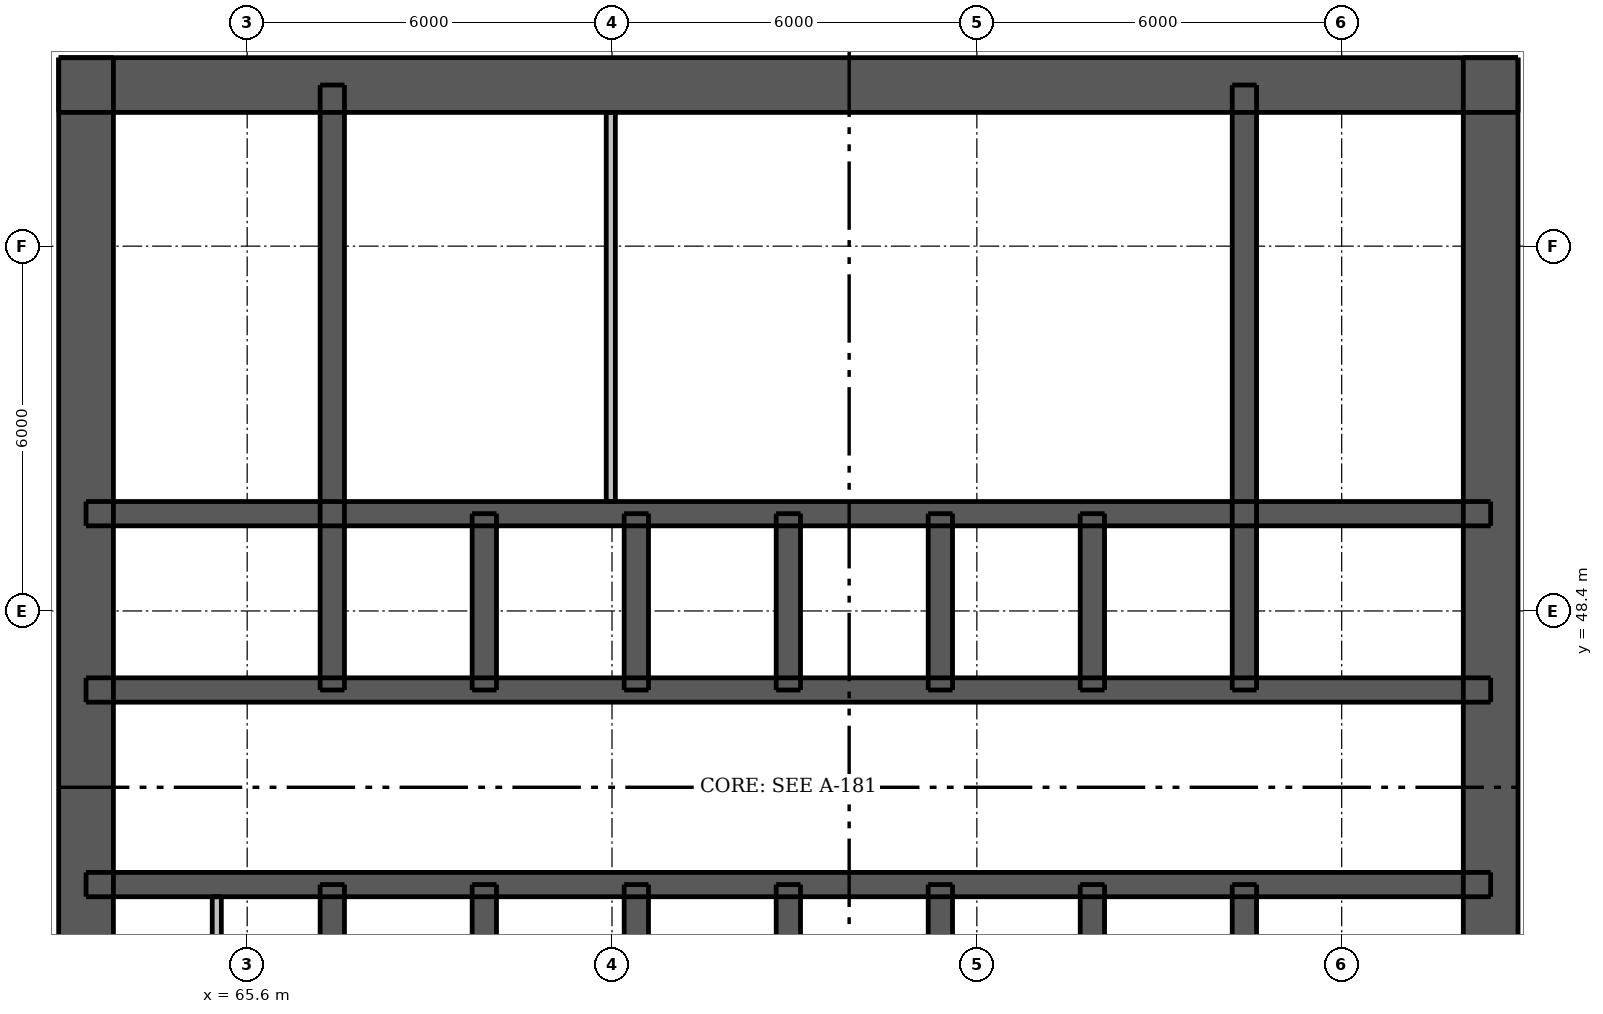
"""IFC4 building model, lengths in metres.
Left out: names, types, materials, properties, quantities, classifications, styles, units other than length and angle.
Written with IfcOpenShell. Run it as: python <this file> out.ifc"""

import sys

from ifc_helpers import new_model, si_unit, direction, frame, frame_2d, origin, place, context, subcontext, project, spatial, rectangle, extrude, element, fill, save


model = new_model("IFC4")
c1 = context("Model", 3, precision=1e-05, world=origin(), true_north=direction((0.0, 1.0)))
c2 = subcontext(c1, "Body", "Model", "MODEL_VIEW")
j1 = project(units=[si_unit("LENGTHUNIT", "METRE"), si_unit("PLANEANGLEUNIT", "RADIAN")], contexts=[c1])
p1 = place(None, origin())
s1 = spatial("IfcSite", under=j1, at=p1, CompositionType="ELEMENT")
p2 = place(p1, origin())
s2 = spatial("IfcBuilding", under=s1, at=p2, CompositionType="ELEMENT")
p3 = place(p2, frame((0.0, 0.0, 5.5)))
s3 = spatial("IfcBuildingStorey", under=s2, at=p3, CompositionType="ELEMENT", Elevation=5.5)
p4 = place(p3, frame((62.5, 57.05, 0.0), z_axis=(0.0, 0.0, 1.0), x_axis=(1.0, 0.0, 0.0)))
e1 = element("IfcWall", 1, at=p4, inside=s3, PredefinedType="SHEAR", context=c2, shape_type="SweptSolid", body=[
    extrude(rectangle(XDim=24.0, YDim=0.9, at=frame_2d((12.0, 0.0))), origin(), (0.0, 0.0, 1.0), 4.2),
])
p5 = place(p4, frame((20.85, 0.0, 0.0)))
e2 = element("IfcOpeningElement", 2, at=p5, cuts=e1, PredefinedType="OPENING", context=c2, shape_type="SweptSolid", body=[
    extrude(rectangle(XDim=1.1, YDim=2.1, at=frame_2d((0.55, 1.05))), frame((0.0, 0.46, 0.0), z_axis=(0.0, -1.0, 0.0), x_axis=(1.0, 0.0, 0.0)), (0.0, 0.0, 1.0), 0.92),
])
p6 = place(p4, frame((2.05, 0.0, 0.0)))
e3 = element("IfcOpeningElement", 3, at=p6, cuts=e1, PredefinedType="OPENING", context=c2, shape_type="SweptSolid", body=[
    extrude(rectangle(XDim=1.1, YDim=2.1, at=frame_2d((0.55, 1.05))), frame((0.0, 0.46, 0.0), z_axis=(0.0, -1.0, 0.0), x_axis=(1.0, 0.0, 0.0)), (0.0, 0.0, 1.0), 0.92),
])
p7 = place(p4, frame((6.44, 0.0, 0.0)))
e4 = element("IfcOpeningElement", 4, at=p7, cuts=e1, PredefinedType="OPENING", context=c2, shape_type="SweptSolid", body=[
    extrude(rectangle(XDim=0.9, YDim=2.1, at=frame_2d((0.45, 1.05))), frame((0.0, 0.46, 0.0), z_axis=(0.0, -1.0, 0.0), x_axis=(1.0, 0.0, 0.0)), (0.0, 0.0, 1.0), 0.92),
])
p8 = place(p4, frame((13.74, 0.0, 0.0)))
e5 = element("IfcOpeningElement", 5, at=p8, cuts=e1, PredefinedType="OPENING", context=c2, shape_type="SweptSolid", body=[
    extrude(rectangle(XDim=0.9, YDim=2.1, at=frame_2d((0.45, 1.05))), frame((0.0, 0.46, 0.0), z_axis=(0.0, -1.0, 0.0), x_axis=(1.0, 0.0, 0.0)), (0.0, 0.0, 1.0), 0.92),
])
p9 = place(p3, frame((62.95, 33.5, 0.0), z_axis=(0.0, 0.0, 1.0), x_axis=(0.0, 1.0, 0.0)))
e6 = element("IfcWall", 6, at=p9, inside=s3, PredefinedType="SHEAR", context=c2, shape_type="SweptSolid", body=[
    extrude(rectangle(XDim=24.0, YDim=0.9, at=frame_2d((12.0, 0.0))), origin(), (0.0, 0.0, 1.0), 4.2),
])
p10 = place(p9, frame((11.2, 0.0, 0.0)))
e7 = element("IfcOpeningElement", 7, at=p10, cuts=e6, PredefinedType="OPENING", context=c2, shape_type="SweptSolid", body=[
    extrude(rectangle(XDim=1.6, YDim=2.1, at=frame_2d((0.8, 1.05))), frame((0.0, 0.46, 0.0), z_axis=(0.0, -1.0, 0.0), x_axis=(1.0, 0.0, 0.0)), (0.0, 0.0, 1.0), 0.92),
])
p11 = place(p3, frame((86.05, 33.5, 0.0), z_axis=(0.0, 0.0, 1.0), x_axis=(0.0, 1.0, 0.0)))
e8 = element("IfcWall", 8, at=p11, inside=s3, PredefinedType="SHEAR", context=c2, shape_type="SweptSolid", body=[
    extrude(rectangle(XDim=24.0, YDim=0.9, at=frame_2d((12.0, 0.0))), origin(), (0.0, 0.0, 1.0), 4.2),
])
p12 = place(p11, frame((11.2, 0.0, 0.0)))
e9 = element("IfcOpeningElement", 9, at=p12, cuts=e8, PredefinedType="OPENING", context=c2, shape_type="SweptSolid", body=[
    extrude(rectangle(XDim=1.6, YDim=2.1, at=frame_2d((0.8, 1.05))), frame((0.0, 0.46, 0.0), z_axis=(0.0, -1.0, 0.0), x_axis=(1.0, 0.0, 0.0)), (0.0, 0.0, 1.0), 0.92),
])
p13 = place(p3, frame((62.95, 43.9, 0.0), z_axis=(0.0, 0.0, 1.0), x_axis=(1.0, 0.0, 0.0)))
e10 = element("IfcWall", 10, at=p13, inside=s3, PredefinedType="SHEAR", context=c2, shape_type="SweptSolid", body=[
    extrude(rectangle(XDim=23.1, YDim=0.4, at=frame_2d((11.55, 0.0))), origin(), (0.0, 0.0, 1.0), 4.2),
])
p14 = place(p13, frame((0.85, 0.0, 0.0)))
e11 = element("IfcOpeningElement", 11, at=p14, cuts=e10, PredefinedType="OPENING", context=c2, shape_type="SweptSolid", body=[
    extrude(rectangle(XDim=0.9, YDim=2.1, at=frame_2d((0.45, 1.05))), frame((0.0, 0.21, 0.0), z_axis=(0.0, -1.0, 0.0), x_axis=(1.0, 0.0, 0.0)), (0.0, 0.0, 1.0), 0.42),
])
p15 = place(p13, frame((2.55, 0.0, 0.0)))
e12 = element("IfcOpeningElement", 12, at=p15, cuts=e10, PredefinedType="OPENING", context=c2, shape_type="SweptSolid", body=[
    extrude(rectangle(XDim=0.9, YDim=2.1, at=frame_2d((0.45, 1.05))), frame((0.0, 0.21, 0.0), z_axis=(0.0, -1.0, 0.0), x_axis=(1.0, 0.0, 0.0)), (0.0, 0.0, 1.0), 0.42),
])
p16 = place(p13, frame((20.5, 0.0, 0.0)))
e13 = element("IfcOpeningElement", 13, at=p16, cuts=e10, PredefinedType="OPENING", context=c2, shape_type="SweptSolid", body=[
    extrude(rectangle(XDim=0.9, YDim=2.1, at=frame_2d((0.45, 1.05))), frame((0.0, 0.21, 0.0), z_axis=(0.0, -1.0, 0.0), x_axis=(1.0, 0.0, 0.0)), (0.0, 0.0, 1.0), 0.42),
])
p17 = place(p13, frame((4.75, 0.0, 0.0)))
e14 = element("IfcOpeningElement", 14, at=p17, cuts=e10, PredefinedType="OPENING", context=c2, shape_type="SweptSolid", body=[
    extrude(rectangle(XDim=1.1, YDim=2.1, at=frame_2d((0.55, 1.05))), frame((0.0, 0.21, 0.0), z_axis=(0.0, -1.0, 0.0), x_axis=(1.0, 0.0, 0.0)), (0.0, 0.0, 1.0), 0.42),
])
p18 = place(p13, frame((7.25, 0.0, 0.0)))
e15 = element("IfcOpeningElement", 15, at=p18, cuts=e10, PredefinedType="OPENING", context=c2, shape_type="SweptSolid", body=[
    extrude(rectangle(XDim=1.1, YDim=2.1, at=frame_2d((0.55, 1.05))), frame((0.0, 0.21, 0.0), z_axis=(0.0, -1.0, 0.0), x_axis=(1.0, 0.0, 0.0)), (0.0, 0.0, 1.0), 0.42),
])
p19 = place(p13, frame((9.75, 0.0, 0.0)))
e16 = element("IfcOpeningElement", 16, at=p19, cuts=e10, PredefinedType="OPENING", context=c2, shape_type="SweptSolid", body=[
    extrude(rectangle(XDim=1.1, YDim=2.1, at=frame_2d((0.55, 1.05))), frame((0.0, 0.21, 0.0), z_axis=(0.0, -1.0, 0.0), x_axis=(1.0, 0.0, 0.0)), (0.0, 0.0, 1.0), 0.42),
])
p20 = place(p13, frame((12.25, 0.0, 0.0)))
e17 = element("IfcOpeningElement", 17, at=p20, cuts=e10, PredefinedType="OPENING", context=c2, shape_type="SweptSolid", body=[
    extrude(rectangle(XDim=1.1, YDim=2.1, at=frame_2d((0.55, 1.05))), frame((0.0, 0.21, 0.0), z_axis=(0.0, -1.0, 0.0), x_axis=(1.0, 0.0, 0.0)), (0.0, 0.0, 1.0), 0.42),
])
p21 = place(p13, frame((14.75, 0.0, 0.0)))
e18 = element("IfcOpeningElement", 18, at=p21, cuts=e10, PredefinedType="OPENING", context=c2, shape_type="SweptSolid", body=[
    extrude(rectangle(XDim=1.1, YDim=2.1, at=frame_2d((0.55, 1.05))), frame((0.0, 0.21, 0.0), z_axis=(0.0, -1.0, 0.0), x_axis=(1.0, 0.0, 0.0)), (0.0, 0.0, 1.0), 0.42),
])
p22 = place(p13, frame((17.25, 0.0, 0.0)))
e19 = element("IfcOpeningElement", 19, at=p22, cuts=e10, PredefinedType="OPENING", context=c2, shape_type="SweptSolid", body=[
    extrude(rectangle(XDim=1.1, YDim=2.1, at=frame_2d((0.55, 1.05))), frame((0.0, 0.21, 0.0), z_axis=(0.0, -1.0, 0.0), x_axis=(1.0, 0.0, 0.0)), (0.0, 0.0, 1.0), 0.42),
])
p23 = place(p3, frame((62.95, 47.1, 0.0), z_axis=(0.0, 0.0, 1.0), x_axis=(1.0, 0.0, 0.0)))
e20 = element("IfcWall", 20, at=p23, inside=s3, PredefinedType="SHEAR", context=c2, shape_type="SweptSolid", body=[
    extrude(rectangle(XDim=23.1, YDim=0.4, at=frame_2d((11.55, 0.0))), origin(), (0.0, 0.0, 1.0), 4.2),
])
p24 = place(p23, frame((1.7, 0.0, 0.0)))
e21 = element("IfcOpeningElement", 21, at=p24, cuts=e20, PredefinedType="OPENING", context=c2, shape_type="SweptSolid", body=[
    extrude(rectangle(XDim=0.9, YDim=2.1, at=frame_2d((0.45, 1.05))), frame((0.0, 0.21, 0.0), z_axis=(0.0, -1.0, 0.0), x_axis=(1.0, 0.0, 0.0)), (0.0, 0.0, 1.0), 0.42),
])
p25 = place(p23, frame((20.5, 0.0, 0.0)))
e22 = element("IfcOpeningElement", 22, at=p25, cuts=e20, PredefinedType="OPENING", context=c2, shape_type="SweptSolid", body=[
    extrude(rectangle(XDim=0.9, YDim=2.1, at=frame_2d((0.45, 1.05))), frame((0.0, 0.21, 0.0), z_axis=(0.0, -1.0, 0.0), x_axis=(1.0, 0.0, 0.0)), (0.0, 0.0, 1.0), 0.42),
])
p26 = place(p3, frame((62.95, 50.0, 0.0), z_axis=(0.0, 0.0, 1.0), x_axis=(1.0, 0.0, 0.0)))
e23 = element("IfcWall", 23, at=p26, inside=s3, PredefinedType="SHEAR", context=c2, shape_type="SweptSolid", body=[
    extrude(rectangle(XDim=23.1, YDim=0.4, at=frame_2d((11.55, 0.0))), origin(), (0.0, 0.0, 1.0), 4.2),
])
p27 = place(p3, frame((67.0, 33.95, 0.0), z_axis=(0.0, 0.0, 1.0), x_axis=(0.0, 1.0, 0.0)))
e24 = element("IfcWall", 24, at=p27, inside=s3, PredefinedType="SHEAR", context=c2, shape_type="SweptSolid", body=[
    extrude(rectangle(XDim=9.95, YDim=0.4, at=frame_2d((4.975, 0.0))), origin(), (0.0, 0.0, 1.0), 4.2),
])
p28 = place(p27, frame((0.65, 0.0, 0.0)))
e25 = element("IfcOpeningElement", 25, at=p28, cuts=e24, PredefinedType="OPENING", context=c2, shape_type="SweptSolid", body=[
    extrude(rectangle(XDim=1.1, YDim=2.1, at=frame_2d((0.55, 1.05))), frame((0.0, 0.21, 0.0), z_axis=(0.0, -1.0, 0.0), x_axis=(1.0, 0.0, 0.0)), (0.0, 0.0, 1.0), 0.42),
])
for number, where, z_axis, x_axis in (
    (26, (67.0, 47.1, 0.0), (0.0, 0.0, 1.0), (0.0, 1.0, 0.0)),
    (27, (82.0, 33.95, 0.0), (0.0, 0.0, 1.0), (0.0, 1.0, 0.0)),
    (28, (82.0, 47.1, 0.0), (0.0, 0.0, 1.0), (0.0, 1.0, 0.0)),
):
    element("IfcWall", number, at=place(p3, frame(where, z_axis=z_axis, x_axis=x_axis)), inside=s3, PredefinedType="SHEAR", context=c2, shape_type="SweptSolid", body=[
        extrude(rectangle(XDim=9.95, YDim=0.4, at=frame_2d((4.975, 0.0))), origin(), (0.0, 0.0, 1.0), 4.2),
    ])
for number, where, z_axis, x_axis in (
    (29, (69.5, 41.0, 0.0), (0.0, 0.0, 1.0), (0.0, 1.0, 0.0)),
    (30, (69.5, 47.1, 0.0), (0.0, 0.0, 1.0), (0.0, 1.0, 0.0)),
    (31, (72.0, 41.0, 0.0), (0.0, 0.0, 1.0), (0.0, 1.0, 0.0)),
    (32, (72.0, 47.1, 0.0), (0.0, 0.0, 1.0), (0.0, 1.0, 0.0)),
    (33, (74.5, 41.0, 0.0), (0.0, 0.0, 1.0), (0.0, 1.0, 0.0)),
    (34, (74.5, 47.1, 0.0), (0.0, 0.0, 1.0), (0.0, 1.0, 0.0)),
    (35, (77.0, 41.0, 0.0), (0.0, 0.0, 1.0), (0.0, 1.0, 0.0)),
    (36, (77.0, 47.1, 0.0), (0.0, 0.0, 1.0), (0.0, 1.0, 0.0)),
    (37, (79.5, 41.0, 0.0), (0.0, 0.0, 1.0), (0.0, 1.0, 0.0)),
    (38, (79.5, 47.1, 0.0), (0.0, 0.0, 1.0), (0.0, 1.0, 0.0)),
):
    element("IfcWall", number, at=place(p3, frame(where, z_axis=z_axis, x_axis=x_axis)), inside=s3, PredefinedType="SHEAR", context=c2, shape_type="SweptSolid", body=[
        extrude(rectangle(XDim=2.9, YDim=0.4, at=frame_2d((1.45, 0.0))), origin(), (0.0, 0.0, 1.0), 4.2),
    ])
p29 = place(p3, frame((65.1, 41.2, 0.0), z_axis=(0.0, 0.0, 1.0), x_axis=(0.0, 1.0, 0.0)))
e39 = element("IfcWall", 39, at=p29, inside=s3, PredefinedType="PLUMBINGWALL", context=c2, shape_type="SweptSolid", body=[
    extrude(rectangle(XDim=2.5, YDim=0.15, at=frame_2d((1.25, 0.0))), origin(), (0.0, 0.0, 1.0), 4.2),
])
p30 = place(p3, frame((71.58, 50.2, 0.0), z_axis=(0.0, 0.0, 1.0), x_axis=(0.0, 1.0, 0.0)))
e40 = element("IfcWall", 40, at=p30, inside=s3, PredefinedType="PLUMBINGWALL", context=c2, shape_type="SweptSolid", body=[
    extrude(rectangle(XDim=6.4, YDim=0.15, at=frame_2d((3.2, 0.0))), origin(), (0.0, 0.0, 1.0), 4.2),
])
p31 = place(p5, origin())
e41 = element("IfcDoor", 41, at=p31, inside=s3, OperationType="SINGLE_SWING_RIGHT", PredefinedType="DOOR", context=c2, shape_type="SweptSolid", body=[
    extrude(rectangle(XDim=1.1, YDim=2.1, at=frame_2d((0.55, 1.05))), frame((0.0, -0.388, 0.0), z_axis=(0.0, -1.0, 0.0), x_axis=(1.0, 0.0, 0.0)), (0.0, 0.0, 1.0), 0.05),
])
fill(e2, e41)
p32 = place(p6, origin())
e42 = element("IfcDoor", 42, at=p32, inside=s3, OperationType="SINGLE_SWING_LEFT", PredefinedType="DOOR", context=c2, shape_type="SweptSolid", body=[
    extrude(rectangle(XDim=1.1, YDim=2.1, at=frame_2d((0.55, 1.05))), frame((0.0, -0.388, 0.0), z_axis=(0.0, -1.0, 0.0), x_axis=(1.0, 0.0, 0.0)), (0.0, 0.0, 1.0), 0.05),
])
fill(e3, e42)
p33 = place(p10, origin())
e43 = element("IfcDoor", 43, at=p33, inside=s3, OperationType="DOUBLE_DOOR_SINGLE_SWING", PredefinedType="DOOR", context=c2, shape_type="SweptSolid", body=[
    extrude(rectangle(XDim=1.6, YDim=2.1, at=frame_2d((0.8, 1.05))), frame((0.0, -0.388, 0.0), z_axis=(0.0, -1.0, 0.0), x_axis=(1.0, 0.0, 0.0)), (0.0, 0.0, 1.0), 0.05),
])
fill(e7, e43)
p34 = place(p12, origin())
e44 = element("IfcDoor", 44, at=p34, inside=s3, OperationType="DOUBLE_DOOR_SINGLE_SWING", PredefinedType="DOOR", context=c2, shape_type="SweptSolid", body=[
    extrude(rectangle(XDim=1.6, YDim=2.1, at=frame_2d((0.8, 1.05))), frame((0.0, 0.438, 0.0), z_axis=(0.0, -1.0, 0.0), x_axis=(1.0, 0.0, 0.0)), (0.0, 0.0, 1.0), 0.05),
])
fill(e9, e44)
p35 = place(p14, origin())
e45 = element("IfcDoor", 45, at=p35, inside=s3, OperationType="SINGLE_SWING_LEFT", PredefinedType="DOOR", context=c2, shape_type="SweptSolid", body=[
    extrude(rectangle(XDim=0.9, YDim=2.1, at=frame_2d((0.45, 1.05))), frame((0.0, -0.138, 0.0), z_axis=(0.0, -1.0, 0.0), x_axis=(1.0, 0.0, 0.0)), (0.0, 0.0, 1.0), 0.05),
])
fill(e11, e45)
p36 = place(p15, origin())
e46 = element("IfcDoor", 46, at=p36, inside=s3, OperationType="SINGLE_SWING_RIGHT", PredefinedType="DOOR", context=c2, shape_type="SweptSolid", body=[
    extrude(rectangle(XDim=0.9, YDim=2.1, at=frame_2d((0.45, 1.05))), frame((0.0, -0.138, 0.0), z_axis=(0.0, -1.0, 0.0), x_axis=(1.0, 0.0, 0.0)), (0.0, 0.0, 1.0), 0.05),
])
fill(e12, e46)
p37 = place(p16, origin())
e47 = element("IfcDoor", 47, at=p37, inside=s3, OperationType="SINGLE_SWING_LEFT", PredefinedType="DOOR", context=c2, shape_type="SweptSolid", body=[
    extrude(rectangle(XDim=0.9, YDim=2.1, at=frame_2d((0.45, 1.05))), frame((0.0, -0.138, 0.0), z_axis=(0.0, -1.0, 0.0), x_axis=(1.0, 0.0, 0.0)), (0.0, 0.0, 1.0), 0.05),
])
fill(e13, e47)
p38 = place(p24, origin())
e48 = element("IfcDoor", 48, at=p38, inside=s3, OperationType="SINGLE_SWING_LEFT", PredefinedType="DOOR", context=c2, shape_type="SweptSolid", body=[
    extrude(rectangle(XDim=0.9, YDim=2.1, at=frame_2d((0.45, 1.05))), frame((0.0, 0.188, 0.0), z_axis=(0.0, -1.0, 0.0), x_axis=(1.0, 0.0, 0.0)), (0.0, 0.0, 1.0), 0.05),
])
fill(e21, e48)
p39 = place(p25, origin())
e49 = element("IfcDoor", 49, at=p39, inside=s3, OperationType="SINGLE_SWING_LEFT", PredefinedType="DOOR", context=c2, shape_type="SweptSolid", body=[
    extrude(rectangle(XDim=0.9, YDim=2.1, at=frame_2d((0.45, 1.05))), frame((0.0, 0.188, 0.0), z_axis=(0.0, -1.0, 0.0), x_axis=(1.0, 0.0, 0.0)), (0.0, 0.0, 1.0), 0.05),
])
fill(e22, e49)
p40 = place(p7, origin())
e50 = element("IfcDoor", 50, at=p40, inside=s3, OperationType="SINGLE_SWING_RIGHT", PredefinedType="DOOR", context=c2, shape_type="SweptSolid", body=[
    extrude(rectangle(XDim=0.9, YDim=2.1, at=frame_2d((0.45, 1.05))), frame((0.0, -0.388, 0.0), z_axis=(0.0, -1.0, 0.0), x_axis=(1.0, 0.0, 0.0)), (0.0, 0.0, 1.0), 0.05),
])
fill(e4, e50)
p41 = place(p8, origin())
e51 = element("IfcDoor", 51, at=p41, inside=s3, OperationType="SINGLE_SWING_RIGHT", PredefinedType="DOOR", context=c2, shape_type="SweptSolid", body=[
    extrude(rectangle(XDim=0.9, YDim=2.1, at=frame_2d((0.45, 1.05))), frame((0.0, -0.388, 0.0), z_axis=(0.0, -1.0, 0.0), x_axis=(1.0, 0.0, 0.0)), (0.0, 0.0, 1.0), 0.05),
])
fill(e5, e51)
p42 = place(p17, origin())
e52 = element("IfcDoor", 52, at=p42, inside=s3, OperationType="DOUBLE_DOOR_SLIDING", PredefinedType="DOOR", context=c2, shape_type="SweptSolid", body=[
    extrude(rectangle(XDim=1.1, YDim=2.1, at=frame_2d((0.55, 1.05))), frame((0.0, 0.025, 0.0), z_axis=(0.0, -1.0, 0.0), x_axis=(1.0, 0.0, 0.0)), (0.0, 0.0, 1.0), 0.05),
])
fill(e14, e52)
p43 = place(p18, origin())
e53 = element("IfcDoor", 53, at=p43, inside=s3, OperationType="DOUBLE_DOOR_SLIDING", PredefinedType="DOOR", context=c2, shape_type="SweptSolid", body=[
    extrude(rectangle(XDim=1.1, YDim=2.1, at=frame_2d((0.55, 1.05))), frame((0.0, 0.025, 0.0), z_axis=(0.0, -1.0, 0.0), x_axis=(1.0, 0.0, 0.0)), (0.0, 0.0, 1.0), 0.05),
])
fill(e15, e53)
p44 = place(p19, origin())
e54 = element("IfcDoor", 54, at=p44, inside=s3, OperationType="DOUBLE_DOOR_SLIDING", PredefinedType="DOOR", context=c2, shape_type="SweptSolid", body=[
    extrude(rectangle(XDim=1.1, YDim=2.1, at=frame_2d((0.55, 1.05))), frame((0.0, 0.025, 0.0), z_axis=(0.0, -1.0, 0.0), x_axis=(1.0, 0.0, 0.0)), (0.0, 0.0, 1.0), 0.05),
])
fill(e16, e54)
p45 = place(p20, origin())
e55 = element("IfcDoor", 55, at=p45, inside=s3, OperationType="DOUBLE_DOOR_SLIDING", PredefinedType="DOOR", context=c2, shape_type="SweptSolid", body=[
    extrude(rectangle(XDim=1.1, YDim=2.1, at=frame_2d((0.55, 1.05))), frame((0.0, 0.025, 0.0), z_axis=(0.0, -1.0, 0.0), x_axis=(1.0, 0.0, 0.0)), (0.0, 0.0, 1.0), 0.05),
])
fill(e17, e55)
p46 = place(p21, origin())
e56 = element("IfcDoor", 56, at=p46, inside=s3, OperationType="DOUBLE_DOOR_SLIDING", PredefinedType="DOOR", context=c2, shape_type="SweptSolid", body=[
    extrude(rectangle(XDim=1.1, YDim=2.1, at=frame_2d((0.55, 1.05))), frame((0.0, 0.025, 0.0), z_axis=(0.0, -1.0, 0.0), x_axis=(1.0, 0.0, 0.0)), (0.0, 0.0, 1.0), 0.05),
])
fill(e18, e56)
p47 = place(p22, origin())
e57 = element("IfcDoor", 57, at=p47, inside=s3, OperationType="DOUBLE_DOOR_SLIDING", PredefinedType="DOOR", context=c2, shape_type="SweptSolid", body=[
    extrude(rectangle(XDim=1.1, YDim=2.1, at=frame_2d((0.55, 1.05))), frame((0.0, 0.025, 0.0), z_axis=(0.0, -1.0, 0.0), x_axis=(1.0, 0.0, 0.0)), (0.0, 0.0, 1.0), 0.05),
])
fill(e19, e57)
save(model, sys.argv[1])
